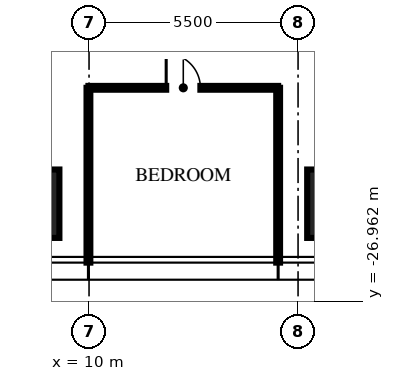
"""IFC4 building model, lengths in metres.
Left out: names, types, materials, properties, quantities, classifications, styles, units other than length and angle.
Written with IfcOpenShell. Run it as: python <this file> out.ifc"""

import sys

from ifc_helpers import new_model, si_unit, direction, frame, frame_2d, origin, origin_2d, place, context, subcontext, project, spatial, rectangle, extrude, element, fill, save


model = new_model("IFC4")
c1 = context("Model", 3, precision=1e-05, world=origin(), true_north=direction((0.0, 1.0)))
c2 = subcontext(c1, "Body", "Model", "MODEL_VIEW")
j1 = project(units=[si_unit("LENGTHUNIT", "METRE"), si_unit("PLANEANGLEUNIT", "RADIAN")], contexts=[c1])
p1 = place(None, origin())
s1 = spatial("IfcSite", under=j1, at=p1, CompositionType="ELEMENT")
p2 = place(p1, origin())
s2 = spatial("IfcBuilding", under=s1, at=p2, CompositionType="ELEMENT")
p3 = place(p2, frame((0.0, 0.0, 237.0)))
s3 = spatial("IfcBuildingStorey", under=s2, at=p3, CompositionType="ELEMENT", Elevation=237.0)
for number, where, z_axis, x_axis in (
    (1, (16.64, -24.4, 0.0), (0.0, 0.0, 1.0), (1.0, 0.0, 0.0)),
    (2, (8.32, -24.4, 0.0), (0.0, 0.0, 1.0), (1.0, 0.0, 0.0)),
):
    element("IfcColumn", number, at=place(p3, frame(where, z_axis=z_axis, x_axis=x_axis)), inside=s3, PredefinedType="COLUMN", context=c2, shape_type="SweptSolid", body=[
        extrude(rectangle(XDim=1.8, YDim=1.8, at=origin_2d()), origin(), (0.0, 0.0, 1.0), 3.75),
    ])
for number, where, z_axis, x_axis in (
    (3, (9.984, -21.35, 0.0), (0.0, 0.0, 1.0), (0.0, -1.0, 0.0)),
    (4, (14.976, -21.35, 0.0), (0.0, 0.0, 1.0), (0.0, -1.0, 0.0)),
):
    element("IfcWall", number, at=place(p3, frame(where, z_axis=z_axis, x_axis=x_axis)), inside=s3, PredefinedType="PARTITIONING", context=c2, shape_type="SweptSolid", body=[
        extrude(rectangle(XDim=4.6, YDim=0.1, at=frame_2d((2.3, 0.0))), origin(), (0.0, 0.0, 1.0), 2.91),
    ])
p4 = place(p3, frame((9.984, -21.35, 0.0), z_axis=(0.0, 0.0, 1.0), x_axis=(1.0, 0.0, 0.0)))
e5 = element("IfcWall", 5, at=p4, inside=s3, PredefinedType="PARTITIONING", context=c2, shape_type="SweptSolid", body=[
    extrude(rectangle(XDim=4.992, YDim=0.1, at=frame_2d((2.496, 0.0))), origin(), (0.0, 0.0, 1.0), 2.81),
])
p5 = place(p4, frame((2.046, 0.0, 0.0)))
e6 = element("IfcOpeningElement", 6, at=p5, cuts=e5, PredefinedType="OPENING", context=c2, shape_type="SweptSolid", body=[
    extrude(rectangle(XDim=0.9, YDim=2.1, at=frame_2d((0.45, 1.05))), frame((0.0, 0.06, 0.0), z_axis=(0.0, -1.0, 0.0), x_axis=(1.0, 0.0, 0.0)), (0.0, 0.0, 1.0), 0.12),
])
p6 = place(p5, origin())
e7 = element("IfcDoor", 7, at=p6, inside=s3, OperationType="SINGLE_SWING_LEFT", PredefinedType="DOOR", context=c2, shape_type="SweptSolid", body=[
    extrude(rectangle(XDim=0.9, YDim=2.1, at=frame_2d((0.45, 1.05))), frame((0.0, 0.025, 0.0), z_axis=(0.0, -1.0, 0.0), x_axis=(1.0, 0.0, 0.0)), (0.0, 0.0, 1.0), 0.05),
])
fill(e6, e7)
save(model, sys.argv[1])
